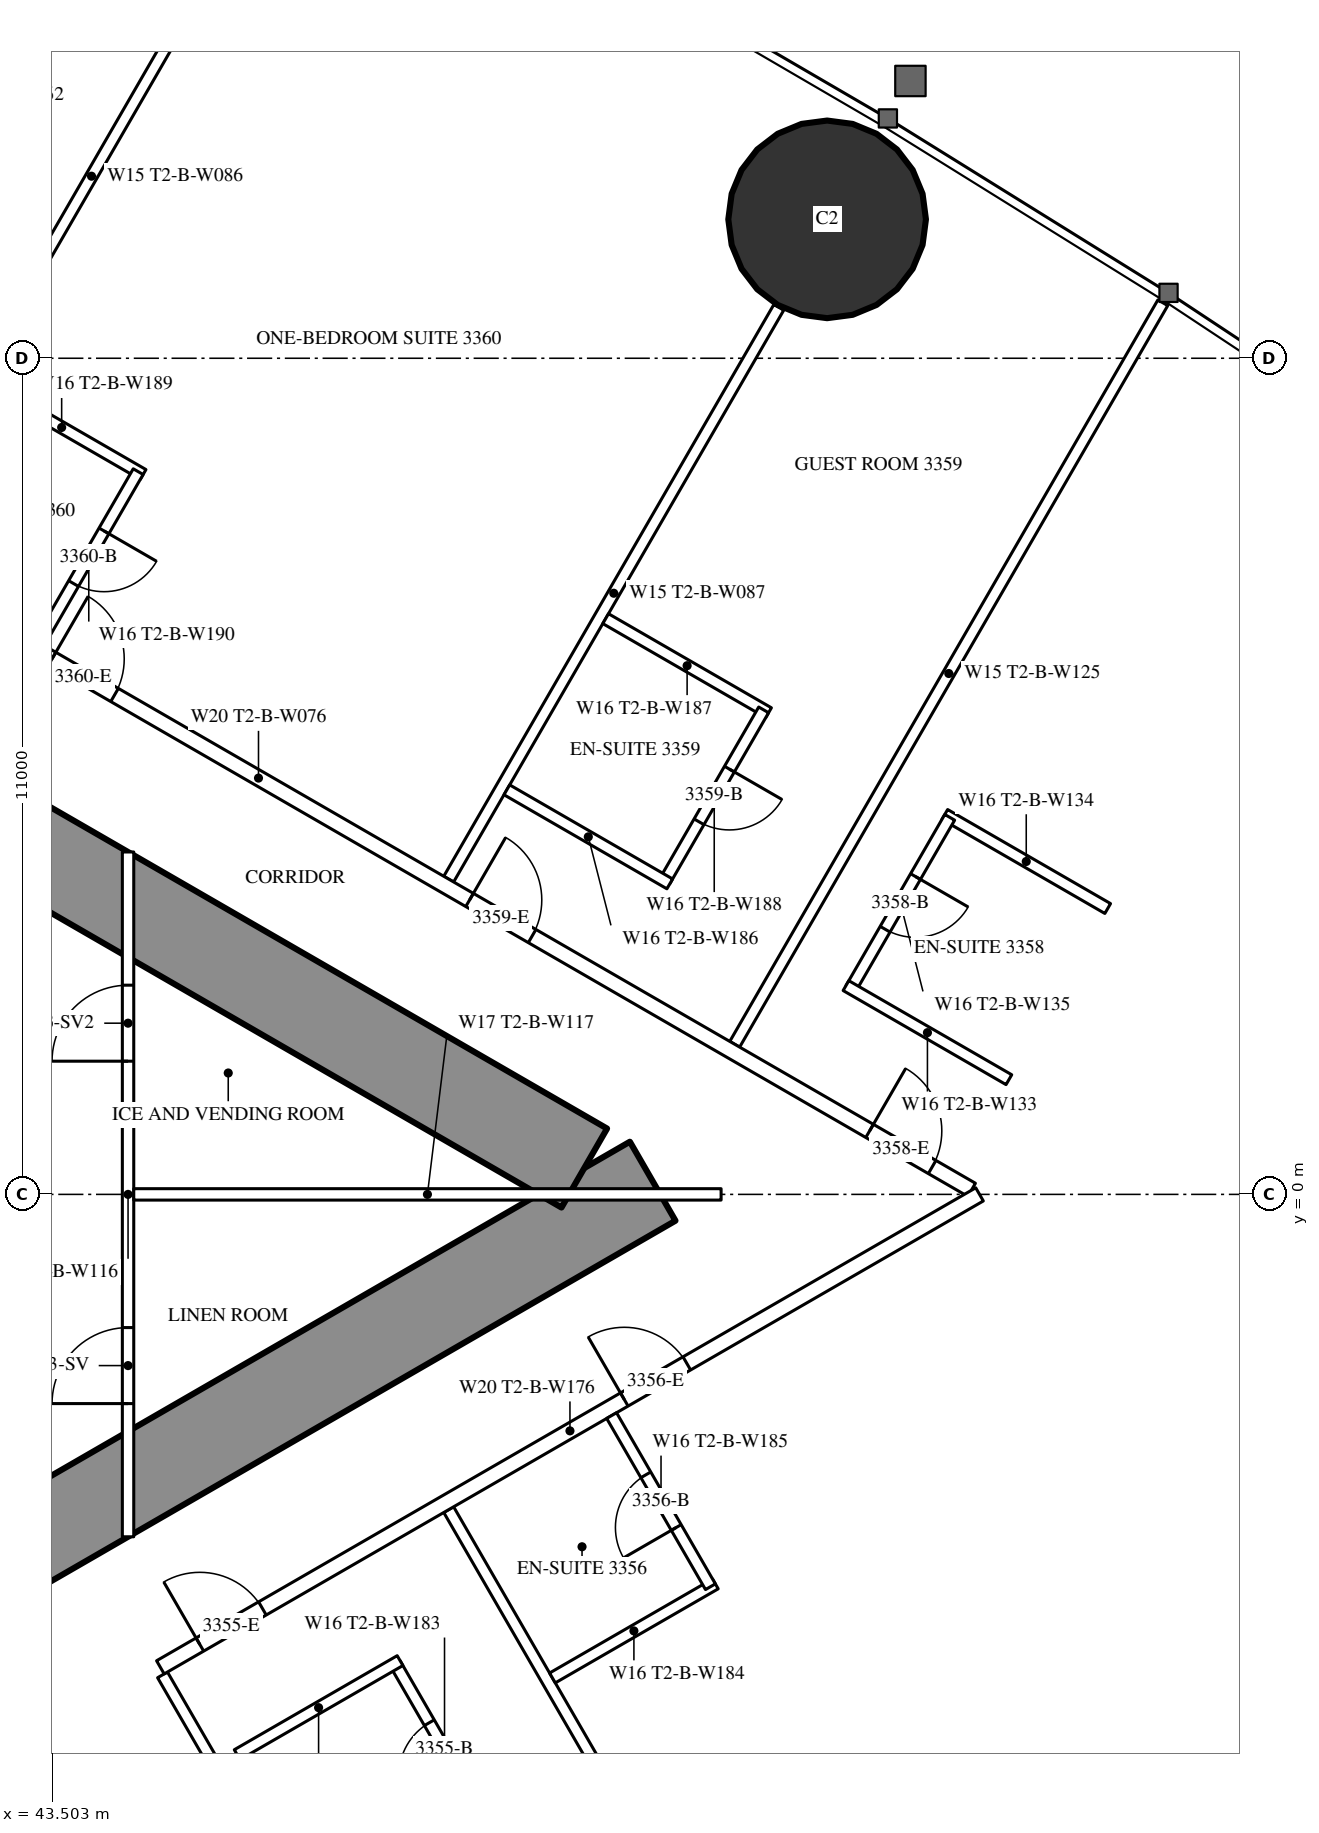
"""IFC4 building model, lengths in metres.
Left out: names, types, materials, properties, quantities, classifications, styles, units other than length and angle.
Written with IfcOpenShell. Run it as: python <this file> out.ifc"""

import sys

from ifc_helpers import new_model, si_unit, direction, frame, frame_2d, origin, origin_2d, place, context, subcontext, project, spatial, rectangle, hollow_circle, extrude, element, fill, save


model = new_model("IFC4")
c1 = context("Model", 3, precision=1e-05, world=origin(), true_north=direction((0.0, 1.0)))
c2 = subcontext(c1, "Body", "Model", "MODEL_VIEW")
j1 = project(units=[si_unit("LENGTHUNIT", "METRE"), si_unit("PLANEANGLEUNIT", "RADIAN")], contexts=[c1])
p1 = place(None, origin())
s1 = spatial("IfcSite", under=j1, at=p1, CompositionType="ELEMENT")
p2 = place(p1, origin())
s2 = spatial("IfcBuilding", under=s1, at=p2, CompositionType="ELEMENT")
p3 = place(p2, frame((0.0, 0.0, 125.6)))
s3 = spatial("IfcBuildingStorey", under=s2, at=p3, CompositionType="ELEMENT", Elevation=125.6)
p4 = place(p3, frame((53.697, 12.827, 0.0), z_axis=(0.0, 0.0, 1.0), x_axis=(1.0, 0.0, 0.0)))
e1 = element("IfcColumn", 1, at=p4, inside=s3, PredefinedType="COLUMN", context=c2, shape_type="SweptSolid", body=[
    extrude(hollow_circle(Radius=1.3, WallThickness=0.1, at=origin_2d()), origin(), (0.0, 0.0, 1.0), 3.5),
])
p5 = place(p3, frame((27.2, -13.8, 0.0), z_axis=(0.0, 0.0, 1.0), x_axis=(0.866027159892, 0.499996958321, 0.0)))
e2 = element("IfcWall", 2, at=p5, inside=s3, PredefinedType="SHEAR", context=c2, shape_type="SweptSolid", body=[
    extrude(rectangle(XDim=27.947, YDim=1.2, at=frame_2d((13.973, 0.0))), origin(), (0.0, 0.0, 1.0), 3.5),
])
p6 = place(p5, frame((4.6, 0.0, 0.0)))
e3 = element("IfcOpeningElement", 3, at=p6, cuts=e2, PredefinedType="OPENING", context=c2, shape_type="SweptSolid", body=[
    extrude(rectangle(XDim=1.0, YDim=2.2, at=frame_2d((0.5, 1.1))), frame((0.0, 0.61, 0.0), z_axis=(0.0, -1.0, 0.0), x_axis=(1.0, 0.0, 0.0)), (0.0, 0.0, 1.0), 1.22),
])
p7 = place(p5, frame((13.395, 0.0, 0.0)))
e4 = element("IfcOpeningElement", 4, at=p7, cuts=e2, PredefinedType="OPENING", context=c2, shape_type="SweptSolid", body=[
    extrude(rectangle(XDim=1.8, YDim=2.2, at=frame_2d((0.9, 1.1))), frame((0.0, 0.61, 0.0), z_axis=(0.0, -1.0, 0.0), x_axis=(1.0, 0.0, 0.0)), (0.0, 0.0, 1.0), 1.22),
])
p8 = place(p3, frame((27.2, 13.8, 0.0), z_axis=(0.0, 0.0, 1.0), x_axis=(0.866024515034, -0.500001539357, 0.0)))
e5 = element("IfcWall", 5, at=p8, inside=s3, PredefinedType="SHEAR", context=c2, shape_type="SweptSolid", body=[
    extrude(rectangle(XDim=26.907, YDim=1.2, at=frame_2d((13.454, 0.0))), origin(), (0.0, 0.0, 1.0), 3.5),
])
p9 = place(p8, frame((4.6, 0.0, 0.0)))
e6 = element("IfcOpeningElement", 6, at=p9, cuts=e5, PredefinedType="OPENING", context=c2, shape_type="SweptSolid", body=[
    extrude(rectangle(XDim=1.0, YDim=2.2, at=frame_2d((0.5, 1.1))), frame((0.0, 0.61, 0.0), z_axis=(0.0, -1.0, 0.0), x_axis=(1.0, 0.0, 0.0)), (0.0, 0.0, 1.0), 1.22),
])
p10 = place(p8, frame((13.395, 0.0, 0.0)))
e7 = element("IfcOpeningElement", 7, at=p10, cuts=e5, PredefinedType="OPENING", context=c2, shape_type="SweptSolid", body=[
    extrude(rectangle(XDim=1.8, YDim=2.2, at=frame_2d((0.9, 1.1))), frame((0.0, 0.61, 0.0), z_axis=(0.0, -1.0, 0.0), x_axis=(1.0, 0.0, 0.0)), (0.0, 0.0, 1.0), 1.22),
])
p11 = place(p3, frame((44.954, -6.321, 0.0), z_axis=(0.0, 0.0, 1.0), x_axis=(0.500018676722, -0.866014620505, 0.0)))
e8 = element("IfcWall", 8, at=p11, inside=s3, PredefinedType="PARTITIONING", context=c2, shape_type="SweptSolid", body=[
    extrude(rectangle(XDim=8.704, YDim=0.15, at=frame_2d((4.352, 0.0))), origin(), (0.0, 0.0, 1.0), 2.2),
])
p12 = place(p3, frame((48.719, -4.147, 0.0), z_axis=(0.0, 0.0, 1.0), x_axis=(0.499990498062, -0.866030889661, 0.0)))
e9 = element("IfcWall", 9, at=p12, inside=s3, PredefinedType="PARTITIONING", context=c2, shape_type="SweptSolid", body=[
    extrude(rectangle(XDim=11.406, YDim=0.15, at=frame_2d((5.703, 0.0))), origin(), (0.0, 0.0, 1.0), 3.25),
])
p13 = place(p3, frame((41.19, 8.494, 0.0), z_axis=(0.0, 0.0, 1.0), x_axis=(0.49999258054, 0.866029687369, 0.0)))
e10 = element("IfcWall", 10, at=p13, inside=s3, PredefinedType="PARTITIONING", context=c2, shape_type="SweptSolid", body=[
    extrude(rectangle(XDim=11.318, YDim=0.15, at=frame_2d((5.659, 0.0))), origin(), (0.0, 0.0, 1.0), 3.25),
])
p14 = place(p3, frame((48.719, 4.147, 0.0), z_axis=(0.0, 0.0, 1.0), x_axis=(0.499993328235, 0.866029255696, 0.0)))
e11 = element("IfcWall", 11, at=p14, inside=s3, PredefinedType="PARTITIONING", context=c2, shape_type="SweptSolid", body=[
    extrude(rectangle(XDim=8.686, YDim=0.15, at=frame_2d((4.343, 0.0))), origin(), (0.0, 0.0, 1.0), 2.2),
])
p15 = place(p3, frame((52.481, 1.975, 0.0), z_axis=(0.0, 0.0, 1.0), x_axis=(0.500003867771, 0.866023170714, 0.0)))
e12 = element("IfcWall", 12, at=p15, inside=s3, PredefinedType="PARTITIONING", context=c2, shape_type="SweptSolid", body=[
    extrude(rectangle(XDim=11.265, YDim=0.15, at=frame_2d((5.632, 0.0))), origin(), (0.0, 0.0, 1.0), 3.25),
])
p16 = place(p3, frame((36.834, 10.894, 0.0), z_axis=(0.0, 0.0, 1.0), x_axis=(0.866028157229, -0.499995230863, 0.0)))
e13 = element("IfcWall", 13, at=p16, inside=s3, PredefinedType="PARTITIONING", context=c2, shape_type="SweptSolid", body=[
    extrude(rectangle(XDim=21.667, YDim=0.2, at=frame_2d((10.833, 0.0))), origin(), (0.0, 0.0, 1.0), 3.25),
])
p17 = place(p16, frame((20.117, 0.0, 0.0)))
e14 = element("IfcOpeningElement", 14, at=p17, cuts=e13, PredefinedType="OPENING", context=c2, shape_type="SweptSolid", body=[
    extrude(rectangle(XDim=0.95, YDim=2.2, at=frame_2d((0.475, 1.1))), frame((0.0, 0.11, 0.0), z_axis=(0.0, -1.0, 0.0), x_axis=(1.0, 0.0, 0.0)), (0.0, 0.0, 1.0), 0.22),
])
p18 = place(p16, frame((14.04, 0.0, 0.0)))
e15 = element("IfcOpeningElement", 15, at=p18, cuts=e13, PredefinedType="OPENING", context=c2, shape_type="SweptSolid", body=[
    extrude(rectangle(XDim=0.95, YDim=2.2, at=frame_2d((0.475, 1.1))), frame((0.0, 0.11, 0.0), z_axis=(0.0, -1.0, 0.0), x_axis=(1.0, 0.0, 0.0)), (0.0, 0.0, 1.0), 0.22),
])
p19 = place(p16, frame((7.697, 0.0, 0.0)))
e16 = element("IfcOpeningElement", 16, at=p19, cuts=e13, PredefinedType="OPENING", context=c2, shape_type="SweptSolid", body=[
    extrude(rectangle(XDim=0.95, YDim=2.2, at=frame_2d((0.475, 1.1))), frame((0.0, 0.11, 0.0), z_axis=(0.0, -1.0, 0.0), x_axis=(1.0, 0.0, 0.0)), (0.0, 0.0, 1.0), 0.22),
])
p20 = place(p16, frame((3.35, 0.0, 0.0)))
e17 = element("IfcOpeningElement", 17, at=p20, cuts=e13, PredefinedType="OPENING", context=c2, shape_type="SweptSolid", body=[
    extrude(rectangle(XDim=1.0, YDim=2.2, at=frame_2d((0.5, 1.1))), frame((0.0, 0.11, 0.0), z_axis=(0.0, -1.0, 0.0), x_axis=(1.0, 0.0, 0.0)), (0.0, 0.0, 1.0), 0.22),
])
p21 = place(p3, frame((44.925, -6.222, 0.0), z_axis=(0.0, 0.0, 1.0), x_axis=(0.866020269055, 0.500008893506, 0.0)))
e18 = element("IfcWall", 18, at=p21, inside=s3, PredefinedType="PARTITIONING", context=c2, shape_type="SweptSolid", body=[
    extrude(rectangle(XDim=12.444, YDim=0.2, at=frame_2d((6.222, 0.0))), origin(), (0.0, 0.0, 1.0), 3.25),
])
p22 = place(p21, frame((0.6, 0.0, 0.0)))
e19 = element("IfcOpeningElement", 19, at=p22, cuts=e18, PredefinedType="OPENING", context=c2, shape_type="SweptSolid", body=[
    extrude(rectangle(XDim=0.95, YDim=2.2, at=frame_2d((0.475, 1.1))), frame((0.0, 0.11, 0.0), z_axis=(0.0, -1.0, 0.0), x_axis=(1.0, 0.0, 0.0)), (0.0, 0.0, 1.0), 0.22),
])
p23 = place(p21, frame((7.047, 0.0, 0.0)))
e20 = element("IfcOpeningElement", 20, at=p23, cuts=e18, PredefinedType="OPENING", context=c2, shape_type="SweptSolid", body=[
    extrude(rectangle(XDim=0.95, YDim=2.2, at=frame_2d((0.475, 1.1))), frame((0.0, 0.11, 0.0), z_axis=(0.0, -1.0, 0.0), x_axis=(1.0, 0.0, 0.0)), (0.0, 0.0, 1.0), 0.22),
])
p24 = place(p3, frame((48.013, -6.171, 0.0), z_axis=(0.0, 0.0, 1.0), x_axis=(0.500006934395, -0.866021400173, 0.0)))
e21 = element("IfcWall", 21, at=p24, inside=s3, PredefinedType="PARTITIONING", context=c2, shape_type="SweptSolid", body=[
    extrude(rectangle(XDim=2.6, YDim=0.15, at=frame_2d((1.3, 0.0))), origin(), (0.0, 0.0, 1.0), 3.25),
])
p25 = place(p24, frame((0.9, 0.0, 0.0)))
e22 = element("IfcOpeningElement", 22, at=p25, cuts=e21, PredefinedType="OPENING", context=c2, shape_type="SweptSolid", body=[
    extrude(rectangle(XDim=0.8, YDim=2.2, at=frame_2d((0.4, 1.1))), frame((0.0, 0.085, 0.0), z_axis=(0.0, -1.0, 0.0), x_axis=(1.0, 0.0, 0.0)), (0.0, 0.0, 1.0), 0.17),
])
p26 = place(p3, frame((45.935, -7.371, 0.0), z_axis=(0.0, 0.0, 1.0), x_axis=(0.866031185235, 0.4999899861, 0.0)))
e23 = element("IfcWall", 23, at=p26, inside=s3, PredefinedType="PARTITIONING", context=c2, shape_type="SweptSolid", body=[
    extrude(rectangle(XDim=2.475, YDim=0.15, at=frame_2d((1.238, 0.0))), origin(), (0.0, 0.0, 1.0), 3.25),
])
p27 = place(p3, frame((50.083, -6.362, 0.0), z_axis=(0.0, 0.0, 1.0), x_axis=(0.866006523861, 0.500032699561, 0.0)))
e24 = element("IfcWall", 24, at=p27, inside=s3, PredefinedType="PARTITIONING", context=c2, shape_type="SweptSolid", body=[
    extrude(rectangle(XDim=2.475, YDim=0.15, at=frame_2d((1.237, 0.0))), origin(), (0.0, 0.0, 1.0), 3.25),
])
p28 = place(p3, frame((50.862, -2.91, 0.0), z_axis=(0.0, 0.0, 1.0), x_axis=(0.500047596559, -0.865997922154, 0.0)))
e25 = element("IfcWall", 25, at=p28, inside=s3, PredefinedType="PARTITIONING", context=c2, shape_type="SweptSolid", body=[
    extrude(rectangle(XDim=2.6, YDim=0.15, at=frame_2d((1.3, 0.0))), origin(), (0.0, 0.0, 1.0), 3.25),
])
p29 = place(p28, frame((0.9, 0.0, 0.0)))
e26 = element("IfcOpeningElement", 26, at=p29, cuts=e25, PredefinedType="OPENING", context=c2, shape_type="SweptSolid", body=[
    extrude(rectangle(XDim=0.8, YDim=2.2, at=frame_2d((0.4, 1.1))), frame((0.0, 0.085, 0.0), z_axis=(0.0, -1.0, 0.0), x_axis=(1.0, 0.0, 0.0)), (0.0, 0.0, 1.0), 0.17),
])
p30 = place(p3, frame((55.245, 4.998, 0.0), z_axis=(0.0, 0.0, 1.0), x_axis=(0.866006523861, -0.500032699561, 0.0)))
e27 = element("IfcWall", 27, at=p30, inside=s3, PredefinedType="PARTITIONING", context=c2, shape_type="SweptSolid", body=[
    extrude(rectangle(XDim=2.475, YDim=0.15, at=frame_2d((1.237, 0.0))), origin(), (0.0, 0.0, 1.0), 3.25),
])
p31 = place(p3, frame((54.01, 2.709, 0.0), z_axis=(0.0, 0.0, 1.0), x_axis=(0.500006934395, 0.866021400173, 0.0)))
e28 = element("IfcWall", 28, at=p31, inside=s3, PredefinedType="PARTITIONING", context=c2, shape_type="SweptSolid", body=[
    extrude(rectangle(XDim=2.6, YDim=0.15, at=frame_2d((1.3, 0.0))), origin(), (0.0, 0.0, 1.0), 3.25),
])
p32 = place(p31, frame((0.9, 0.0, 0.0)))
e29 = element("IfcOpeningElement", 29, at=p32, cuts=e28, PredefinedType="OPENING", context=c2, shape_type="SweptSolid", body=[
    extrude(rectangle(XDim=0.8, YDim=2.2, at=frame_2d((0.4, 1.1))), frame((0.0, 0.085, 0.0), z_axis=(0.0, -1.0, 0.0), x_axis=(1.0, 0.0, 0.0)), (0.0, 0.0, 1.0), 0.17),
])
p33 = place(p3, frame((53.945, 2.747, 0.0), z_axis=(0.0, 0.0, 1.0), x_axis=(0.866031185235, -0.4999899861, 0.0)))
e30 = element("IfcWall", 30, at=p33, inside=s3, PredefinedType="PARTITIONING", context=c2, shape_type="SweptSolid", body=[
    extrude(rectangle(XDim=2.475, YDim=0.15, at=frame_2d((1.238, 0.0))), origin(), (0.0, 0.0, 1.0), 3.25),
])
p34 = place(p3, frame((50.783, 7.574, 0.0), z_axis=(0.0, 0.0, 1.0), x_axis=(0.866006523861, -0.500032699561, 0.0)))
e31 = element("IfcWall", 31, at=p34, inside=s3, PredefinedType="PARTITIONING", context=c2, shape_type="SweptSolid", body=[
    extrude(rectangle(XDim=2.475, YDim=0.15, at=frame_2d((1.237, 0.0))), origin(), (0.0, 0.0, 1.0), 3.25),
])
p35 = place(p3, frame((51.562, 4.123, 0.0), z_axis=(0.0, 0.0, 1.0), x_axis=(0.49997716683, 0.86603858612, 0.0)))
e32 = element("IfcWall", 32, at=p35, inside=s3, PredefinedType="PARTITIONING", context=c2, shape_type="SweptSolid", body=[
    extrude(rectangle(XDim=2.6, YDim=0.15, at=frame_2d((1.3, 0.0))), origin(), (0.0, 0.0, 1.0), 3.25),
])
p36 = place(p35, frame((0.9, 0.0, 0.0)))
e33 = element("IfcOpeningElement", 33, at=p36, cuts=e32, PredefinedType="OPENING", context=c2, shape_type="SweptSolid", body=[
    extrude(rectangle(XDim=0.8, YDim=2.2, at=frame_2d((0.4, 1.1))), frame((0.0, 0.085, 0.0), z_axis=(0.0, -1.0, 0.0), x_axis=(1.0, 0.0, 0.0)), (0.0, 0.0, 1.0), 0.17),
])
for number, where, z_axis, x_axis in (
    (34, (49.483, 5.323, 0.0), (0.0, 0.0, 1.0), (0.866, -0.5, 0.0)),
    (35, (42.555, 10.708, 0.0), (0.0, 0.0, 1.0), (0.866, -0.5, 0.0)),
):
    element("IfcWall", number, at=place(p3, frame(where, z_axis=z_axis, x_axis=x_axis)), inside=s3, PredefinedType="PARTITIONING", context=c2, shape_type="SweptSolid", body=[
        extrude(rectangle(XDim=2.475, YDim=0.15, at=frame_2d((1.238, 0.0))), origin(), (0.0, 0.0, 1.0), 3.25),
    ])
p37 = place(p3, frame((43.333, 7.257, 0.0), z_axis=(0.0, 0.0, 1.0), x_axis=(0.500006934395, 0.866021400173, 0.0)))
e36 = element("IfcWall", 36, at=p37, inside=s3, PredefinedType="PARTITIONING", context=c2, shape_type="SweptSolid", body=[
    extrude(rectangle(XDim=2.6, YDim=0.15, at=frame_2d((1.3, 0.0))), origin(), (0.0, 0.0, 1.0), 3.25),
])
p38 = place(p37, frame((0.9, 0.0, 0.0)))
e37 = element("IfcOpeningElement", 37, at=p38, cuts=e36, PredefinedType="OPENING", context=c2, shape_type="SweptSolid", body=[
    extrude(rectangle(XDim=0.8, YDim=2.2, at=frame_2d((0.4, 1.1))), frame((0.0, 0.085, 0.0), z_axis=(0.0, -1.0, 0.0), x_axis=(1.0, 0.0, 0.0)), (0.0, 0.0, 1.0), 0.17),
])
p39 = place(p3, frame((44.5, -4.505, 0.0), z_axis=(0.0, 0.0, 1.0), x_axis=(0.0, 1.0, 0.0)))
e38 = element("IfcWall", 38, at=p39, inside=s3, PredefinedType="PARTITIONING", context=c2, shape_type="SweptSolid", body=[
    extrude(rectangle(XDim=9.009, YDim=0.15, at=frame_2d((4.505, 0.0))), origin(), (0.0, 0.0, 1.0), 2.45),
])
p40 = place(p39, frame((1.752, 0.0, 0.0)))
e39 = element("IfcOpeningElement", 39, at=p40, cuts=e38, PredefinedType="OPENING", context=c2, shape_type="SweptSolid", body=[
    extrude(rectangle(XDim=1.0, YDim=2.2, at=frame_2d((0.5, 1.1))), frame((0.0, 0.085, 0.0), z_axis=(0.0, -1.0, 0.0), x_axis=(1.0, 0.0, 0.0)), (0.0, 0.0, 1.0), 0.17),
])
p41 = place(p39, frame((6.257, 0.0, 0.0)))
e40 = element("IfcOpeningElement", 40, at=p41, cuts=e38, PredefinedType="OPENING", context=c2, shape_type="SweptSolid", body=[
    extrude(rectangle(XDim=1.0, YDim=2.2, at=frame_2d((0.5, 1.1))), frame((0.0, 0.085, 0.0), z_axis=(0.0, -1.0, 0.0), x_axis=(1.0, 0.0, 0.0)), (0.0, 0.0, 1.0), 0.17),
])
p42 = place(p3, frame((44.575, 0.0, 0.0), z_axis=(0.0, 0.0, 1.0), x_axis=(1.0, 0.0, 0.0)))
e41 = element("IfcWall", 41, at=p42, inside=s3, PredefinedType="PARTITIONING", context=c2, shape_type="SweptSolid", body=[
    extrude(rectangle(XDim=7.727, YDim=0.15, at=frame_2d((3.864, 0.0))), origin(), (0.0, 0.0, 1.0), 2.2),
])
p43 = place(p25, origin())
e42 = element("IfcDoor", 42, at=p43, inside=s3, OperationType="SINGLE_SWING_RIGHT", PredefinedType="DOOR", context=c2, shape_type="SweptSolid", body=[
    extrude(rectangle(XDim=0.8, YDim=2.2, at=frame_2d((0.4, 1.1))), frame((0.0, 0.025, 0.0), z_axis=(0.0, -1.0, 0.0), x_axis=(1.0, 0.0, 0.0)), (0.0, 0.0, 1.0), 0.05),
])
fill(e22, e42)
p44 = place(p22, origin())
e43 = element("IfcDoor", 43, at=p44, inside=s3, OperationType="SINGLE_SWING_LEFT", PredefinedType="DOOR", context=c2, shape_type="SweptSolid", body=[
    extrude(rectangle(XDim=0.95, YDim=2.2, at=frame_2d((0.475, 1.1))), frame((0.0, 0.025, 0.0), z_axis=(0.0, -1.0, 0.0), x_axis=(1.0, 0.0, 0.0)), (0.0, 0.0, 1.0), 0.05),
])
fill(e19, e43)
p45 = place(p29, origin())
e44 = element("IfcDoor", 44, at=p45, inside=s3, OperationType="SINGLE_SWING_RIGHT", PredefinedType="DOOR", context=c2, shape_type="SweptSolid", body=[
    extrude(rectangle(XDim=0.8, YDim=2.2, at=frame_2d((0.4, 1.1))), frame((0.0, 0.025, 0.0), z_axis=(0.0, -1.0, 0.0), x_axis=(1.0, 0.0, 0.0)), (0.0, 0.0, 1.0), 0.05),
])
fill(e26, e44)
p46 = place(p23, origin())
e45 = element("IfcDoor", 45, at=p46, inside=s3, OperationType="SINGLE_SWING_LEFT", PredefinedType="DOOR", context=c2, shape_type="SweptSolid", body=[
    extrude(rectangle(XDim=0.95, YDim=2.2, at=frame_2d((0.475, 1.1))), frame((0.0, 0.025, 0.0), z_axis=(0.0, -1.0, 0.0), x_axis=(1.0, 0.0, 0.0)), (0.0, 0.0, 1.0), 0.05),
])
fill(e20, e45)
p47 = place(p32, origin())
e46 = element("IfcDoor", 46, at=p47, inside=s3, OperationType="SINGLE_SWING_RIGHT", PredefinedType="DOOR", context=c2, shape_type="SweptSolid", body=[
    extrude(rectangle(XDim=0.8, YDim=2.2, at=frame_2d((0.4, 1.1))), frame((0.0, 0.025, 0.0), z_axis=(0.0, -1.0, 0.0), x_axis=(1.0, 0.0, 0.0)), (0.0, 0.0, 1.0), 0.05),
])
fill(e29, e46)
p48 = place(p17, origin())
e47 = element("IfcDoor", 47, at=p48, inside=s3, OperationType="SINGLE_SWING_LEFT", PredefinedType="DOOR", context=c2, shape_type="SweptSolid", body=[
    extrude(rectangle(XDim=0.95, YDim=2.2, at=frame_2d((0.475, 1.1))), frame((0.0, 0.025, 0.0), z_axis=(0.0, -1.0, 0.0), x_axis=(1.0, 0.0, 0.0)), (0.0, 0.0, 1.0), 0.05),
])
fill(e14, e47)
p49 = place(p36, origin())
e48 = element("IfcDoor", 48, at=p49, inside=s3, OperationType="SINGLE_SWING_RIGHT", PredefinedType="DOOR", context=c2, shape_type="SweptSolid", body=[
    extrude(rectangle(XDim=0.8, YDim=2.2, at=frame_2d((0.4, 1.1))), frame((0.0, 0.025, 0.0), z_axis=(0.0, -1.0, 0.0), x_axis=(1.0, 0.0, 0.0)), (0.0, 0.0, 1.0), 0.05),
])
fill(e33, e48)
p50 = place(p18, origin())
e49 = element("IfcDoor", 49, at=p50, inside=s3, OperationType="SINGLE_SWING_LEFT", PredefinedType="DOOR", context=c2, shape_type="SweptSolid", body=[
    extrude(rectangle(XDim=0.95, YDim=2.2, at=frame_2d((0.475, 1.1))), frame((0.0, 0.025, 0.0), z_axis=(0.0, -1.0, 0.0), x_axis=(1.0, 0.0, 0.0)), (0.0, 0.0, 1.0), 0.05),
])
fill(e15, e49)
p51 = place(p38, origin())
e50 = element("IfcDoor", 50, at=p51, inside=s3, OperationType="SINGLE_SWING_RIGHT", PredefinedType="DOOR", context=c2, shape_type="SweptSolid", body=[
    extrude(rectangle(XDim=0.8, YDim=2.2, at=frame_2d((0.4, 1.1))), frame((0.0, 0.025, 0.0), z_axis=(0.0, -1.0, 0.0), x_axis=(1.0, 0.0, 0.0)), (0.0, 0.0, 1.0), 0.05),
])
fill(e37, e50)
p52 = place(p19, origin())
e51 = element("IfcDoor", 51, at=p52, inside=s3, OperationType="SINGLE_SWING_LEFT", PredefinedType="DOOR", context=c2, shape_type="SweptSolid", body=[
    extrude(rectangle(XDim=0.95, YDim=2.2, at=frame_2d((0.475, 1.1))), frame((0.0, 0.025, 0.0), z_axis=(0.0, -1.0, 0.0), x_axis=(1.0, 0.0, 0.0)), (0.0, 0.0, 1.0), 0.05),
])
fill(e16, e51)
p53 = place(p40, origin())
e52 = element("IfcDoor", 52, at=p53, inside=s3, OperationType="SINGLE_SWING_LEFT", PredefinedType="DOOR", context=c2, shape_type="SweptSolid", body=[
    extrude(rectangle(XDim=1.0, YDim=2.2, at=frame_2d((0.5, 1.1))), frame((0.0, 0.025, 0.0), z_axis=(0.0, -1.0, 0.0), x_axis=(1.0, 0.0, 0.0)), (0.0, 0.0, 1.0), 0.05),
])
fill(e39, e52)
p54 = place(p41, origin())
e53 = element("IfcDoor", 53, at=p54, inside=s3, OperationType="SINGLE_SWING_LEFT", PredefinedType="DOOR", context=c2, shape_type="SweptSolid", body=[
    extrude(rectangle(XDim=1.0, YDim=2.2, at=frame_2d((0.5, 1.1))), frame((0.0, 0.025, 0.0), z_axis=(0.0, -1.0, 0.0), x_axis=(1.0, 0.0, 0.0)), (0.0, 0.0, 1.0), 0.05),
])
fill(e40, e53)
save(model, sys.argv[1])
